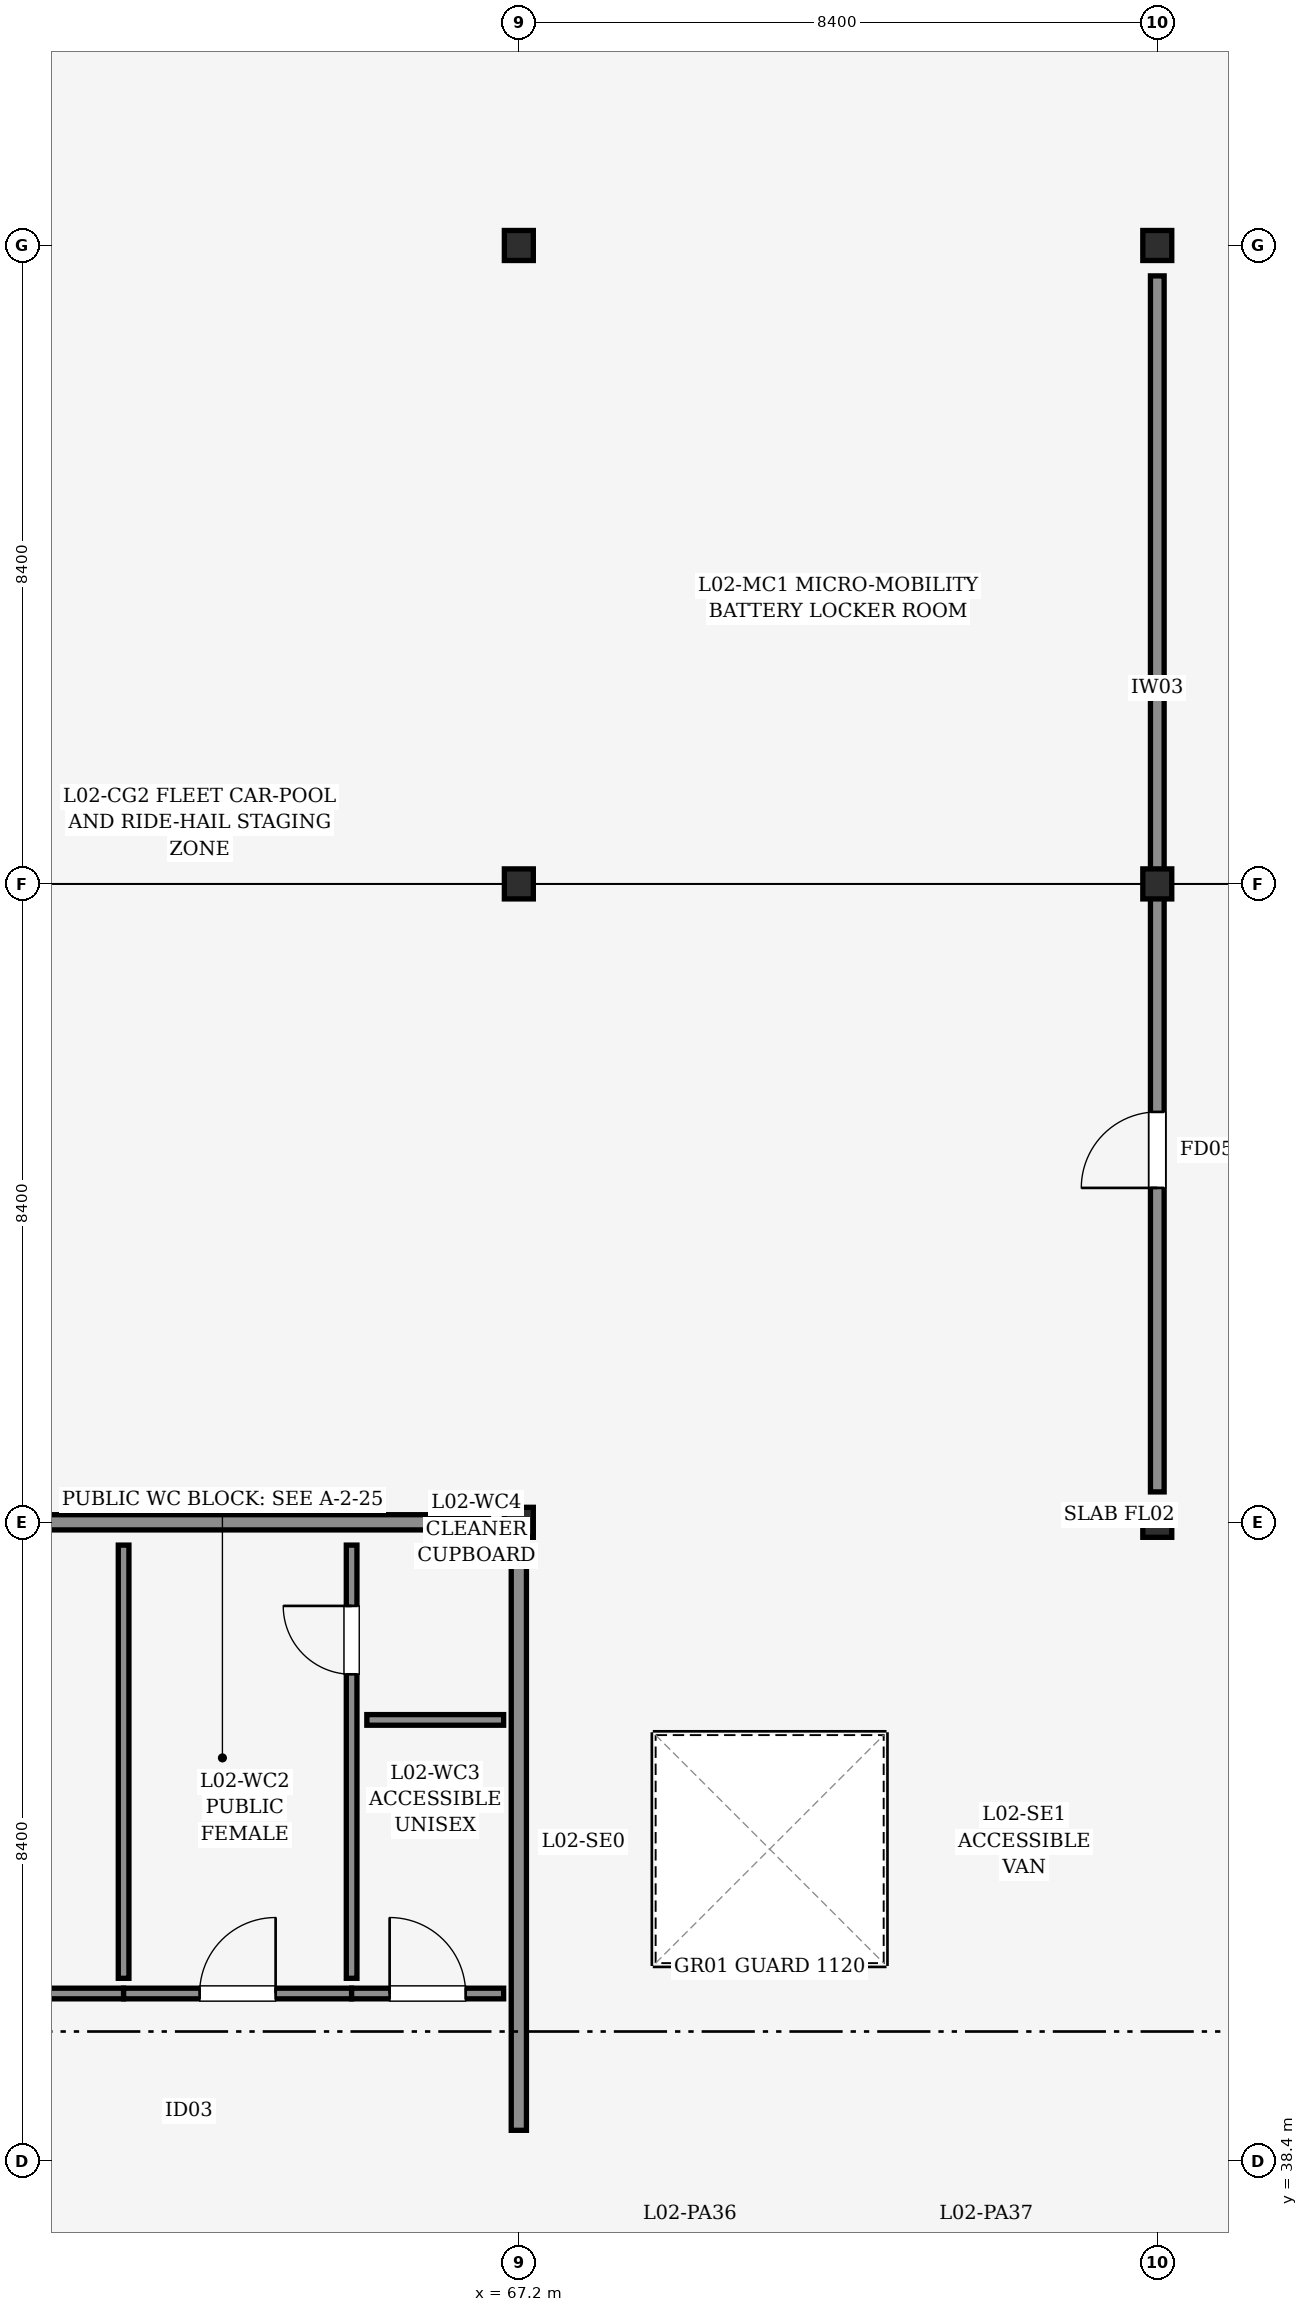
"""IFC4 building model, lengths in metres.
Left out: names, types, materials, properties, quantities, classifications, styles, units other than length and angle.
Written with IfcOpenShell. Run it as: python <this file> out.ifc"""

import sys

from ifc_helpers import new_model, si_unit, direction, frame, frame_2d, origin, origin_2d, place, context, subcontext, project, spatial, rectangle, i_section, extrude, element, fill, save


model = new_model("IFC4")
c1 = context("Model", 3, precision=1e-05, world=origin(), true_north=direction((0.0, 1.0)))
c2 = subcontext(c1, "Body", "Model", "MODEL_VIEW")
j1 = project(units=[si_unit("LENGTHUNIT", "METRE"), si_unit("PLANEANGLEUNIT", "RADIAN")], contexts=[c1])
p1 = place(None, origin())
s1 = spatial("IfcSite", under=j1, at=p1, CompositionType="ELEMENT")
p2 = place(p1, origin())
s2 = spatial("IfcBuilding", under=s1, at=p2, CompositionType="ELEMENT")
p3 = place(p2, frame((0.0, 0.0, 9.0)))
s3 = spatial("IfcBuildingStorey", under=s2, at=p3, CompositionType="ELEMENT", Elevation=9.0)
for number, where, z_axis, x_axis in (
    (1, (67.2, 38.4, 0.0), (0.0, 0.0, 1.0), (1.0, 0.0, 0.0)),
    (2, (67.2, 46.8, 0.0), (0.0, 0.0, 1.0), (1.0, 0.0, 0.0)),
    (3, (67.2, 55.2, 0.0), (0.0, 0.0, 1.0), (1.0, 0.0, 0.0)),
    (4, (67.2, 63.6, 0.0), (0.0, 0.0, 1.0), (1.0, 0.0, 0.0)),
    (5, (75.6, 38.4, 0.0), (0.0, 0.0, 1.0), (1.0, 0.0, 0.0)),
    (6, (75.6, 46.8, 0.0), (0.0, 0.0, 1.0), (1.0, 0.0, 0.0)),
    (7, (75.6, 55.2, 0.0), (0.0, 0.0, 1.0), (1.0, 0.0, 0.0)),
    (8, (75.6, 63.6, 0.0), (0.0, 0.0, 1.0), (1.0, 0.0, 0.0)),
):
    element("IfcColumn", number, at=place(p3, frame(where, z_axis=z_axis, x_axis=x_axis)), inside=s3, PredefinedType="COLUMN", context=c2, shape_type="SweptSolid", body=[
        extrude(i_section(OverallWidth=0.395, OverallDepth=0.381, WebThickness=0.018, FlangeThickness=0.03, FilletRadius=0.015, at=origin_2d()), origin(), (0.0, 0.0, 1.0), 3.6),
    ])
p4 = place(p3, frame((59.2, 38.4, 0.0), z_axis=(0.0, 0.0, 1.0), x_axis=(1.0, 0.0, 0.0)))
e9 = element("IfcWall", 9, at=p4, inside=s3, PredefinedType="PARTITIONING", context=c2, shape_type="SweptSolid", body=[
    extrude(rectangle(XDim=7.6, YDim=0.2, at=frame_2d((3.8, 0.0))), origin(), (0.0, 0.0, 1.0), 2.525),
])
p5 = place(p4, frame((3.2, 0.0, 0.0)))
e10 = element("IfcOpeningElement", 10, at=p5, cuts=e9, PredefinedType="OPENING", context=c2, shape_type="SweptSolid", body=[
    extrude(rectangle(XDim=0.92, YDim=2.1, at=frame_2d((0.46, 1.05))), frame((0.0, 0.11, 0.0), z_axis=(0.0, -1.0, 0.0), x_axis=(1.0, 0.0, 0.0)), (0.0, 0.0, 1.0), 0.22),
])
p6 = place(p3, frame((59.2, 46.8, 0.0), z_axis=(0.0, 0.0, 1.0), x_axis=(1.0, 0.0, 0.0)))
e11 = element("IfcWall", 11, at=p6, inside=s3, PredefinedType="PARTITIONING", context=c2, shape_type="SweptSolid", body=[
    extrude(rectangle(XDim=7.6, YDim=0.2, at=frame_2d((3.8, 0.0))), origin(), (0.0, 0.0, 1.0), 2.525),
])
p7 = place(p3, frame((67.2, 38.8, 0.0), z_axis=(0.0, 0.0, 1.0), x_axis=(0.0, 1.0, 0.0)))
e12 = element("IfcWall", 12, at=p7, inside=s3, PredefinedType="PARTITIONING", context=c2, shape_type="SweptSolid", body=[
    extrude(rectangle(XDim=7.6, YDim=0.2, at=frame_2d((3.8, 0.0))), origin(), (0.0, 0.0, 1.0), 2.525),
])
p8 = place(p3, frame((59.0, 40.6, 0.0), z_axis=(0.0, 0.0, 1.0), x_axis=(1.0, 0.0, 0.0)))
e13 = element("IfcWall", 13, at=p8, inside=s3, PredefinedType="PARTITIONING", context=c2, shape_type="SweptSolid", body=[
    extrude(rectangle(XDim=3.0, YDim=0.14, at=frame_2d((1.5, 0.0))), origin(), (0.0, 0.0, 1.0), 2.525),
])
p9 = place(p8, frame((1.0, 0.0, 0.0)))
e14 = element("IfcOpeningElement", 14, at=p9, cuts=e13, PredefinedType="OPENING", context=c2, shape_type="SweptSolid", body=[
    extrude(rectangle(XDim=1.0, YDim=2.1, at=frame_2d((0.5, 1.05))), frame((0.0, 0.08, 0.0), z_axis=(0.0, -1.0, 0.0), x_axis=(1.0, 0.0, 0.0)), (0.0, 0.0, 1.0), 0.16),
])
p10 = place(p3, frame((62.0, 40.6, 0.0), z_axis=(0.0, 0.0, 1.0), x_axis=(1.0, 0.0, 0.0)))
e15 = element("IfcWall", 15, at=p10, inside=s3, PredefinedType="PARTITIONING", context=c2, shape_type="SweptSolid", body=[
    extrude(rectangle(XDim=3.0, YDim=0.14, at=frame_2d((1.5, 0.0))), origin(), (0.0, 0.0, 1.0), 2.525),
])
p11 = place(p10, frame((1.0, 0.0, 0.0)))
e16 = element("IfcOpeningElement", 16, at=p11, cuts=e15, PredefinedType="OPENING", context=c2, shape_type="SweptSolid", body=[
    extrude(rectangle(XDim=1.0, YDim=2.1, at=frame_2d((0.5, 1.05))), frame((0.0, 0.08, 0.0), z_axis=(0.0, -1.0, 0.0), x_axis=(1.0, 0.0, 0.0)), (0.0, 0.0, 1.0), 0.16),
])
p12 = place(p3, frame((65.0, 40.6, 0.0), z_axis=(0.0, 0.0, 1.0), x_axis=(1.0, 0.0, 0.0)))
e17 = element("IfcWall", 17, at=p12, inside=s3, PredefinedType="PARTITIONING", context=c2, shape_type="SweptSolid", body=[
    extrude(rectangle(XDim=2.0, YDim=0.14, at=frame_2d((1.0, 0.0))), origin(), (0.0, 0.0, 1.0), 2.525),
])
p13 = place(p12, frame((0.5, 0.0, 0.0)))
e18 = element("IfcOpeningElement", 18, at=p13, cuts=e17, PredefinedType="OPENING", context=c2, shape_type="SweptSolid", body=[
    extrude(rectangle(XDim=1.0, YDim=2.1, at=frame_2d((0.5, 1.05))), frame((0.0, 0.08, 0.0), z_axis=(0.0, -1.0, 0.0), x_axis=(1.0, 0.0, 0.0)), (0.0, 0.0, 1.0), 0.16),
])
p14 = place(p3, frame((62.0, 40.8, 0.0), z_axis=(0.0, 0.0, 1.0), x_axis=(0.0, 1.0, 0.0)))
e19 = element("IfcWall", 19, at=p14, inside=s3, PredefinedType="PARTITIONING", context=c2, shape_type="SweptSolid", body=[
    extrude(rectangle(XDim=5.7, YDim=0.14, at=frame_2d((2.85, 0.0))), origin(), (0.0, 0.0, 1.0), 2.525),
])
p15 = place(p3, frame((65.0, 40.8, 0.0), z_axis=(0.0, 0.0, 1.0), x_axis=(0.0, 1.0, 0.0)))
e20 = element("IfcWall", 20, at=p15, inside=s3, PredefinedType="PARTITIONING", context=c2, shape_type="SweptSolid", body=[
    extrude(rectangle(XDim=5.7, YDim=0.14, at=frame_2d((2.85, 0.0))), origin(), (0.0, 0.0, 1.0), 2.525),
])
p16 = place(p15, frame((4.0, 0.0, 0.0)))
e21 = element("IfcOpeningElement", 21, at=p16, cuts=e20, PredefinedType="OPENING", context=c2, shape_type="SweptSolid", body=[
    extrude(rectangle(XDim=0.9, YDim=2.05, at=frame_2d((0.45, 1.025))), frame((0.0, 0.08, 0.0), z_axis=(0.0, -1.0, 0.0), x_axis=(1.0, 0.0, 0.0)), (0.0, 0.0, 1.0), 0.16),
])
p17 = place(p3, frame((65.2, 44.2, 0.0), z_axis=(0.0, 0.0, 1.0), x_axis=(1.0, 0.0, 0.0)))
e22 = element("IfcWall", 22, at=p17, inside=s3, PredefinedType="PARTITIONING", context=c2, shape_type="SweptSolid", body=[
    extrude(rectangle(XDim=1.8, YDim=0.14, at=frame_2d((0.9, 0.0))), origin(), (0.0, 0.0, 1.0), 2.525),
])
p18 = place(p3, frame((75.6, 47.2, 0.0), z_axis=(0.0, 0.0, 1.0), x_axis=(0.0, 1.0, 0.0)))
e23 = element("IfcWall", 23, at=p18, inside=s3, PredefinedType="PARTITIONING", context=c2, shape_type="SweptSolid", body=[
    extrude(rectangle(XDim=16.0, YDim=0.18, at=frame_2d((8.0, 0.0))), origin(), (0.0, 0.0, 1.0), 2.525),
])
p19 = place(p18, frame((4.0, 0.0, 0.0)))
e24 = element("IfcOpeningElement", 24, at=p19, cuts=e23, PredefinedType="OPENING", context=c2, shape_type="SweptSolid", body=[
    extrude(rectangle(XDim=1.0, YDim=2.15, at=frame_2d((0.5, 1.075))), frame((0.0, 0.1, 0.0), z_axis=(0.0, -1.0, 0.0), x_axis=(1.0, 0.0, 0.0)), (0.0, 0.0, 1.0), 0.2),
])
p20 = place(p5, origin())
e25 = element("IfcDoor", 25, at=p20, inside=s3, OperationType="SINGLE_SWING_RIGHT", PredefinedType="DOOR", context=c2, shape_type="SweptSolid", body=[
    extrude(rectangle(XDim=0.92, YDim=2.1, at=frame_2d((0.46, 1.05))), frame((0.0, 0.025, 0.0), z_axis=(0.0, -1.0, 0.0), x_axis=(1.0, 0.0, 0.0)), (0.0, 0.0, 1.0), 0.05),
])
fill(e10, e25)
p21 = place(p11, origin())
e26 = element("IfcDoor", 26, at=p21, inside=s3, OperationType="SINGLE_SWING_RIGHT", PredefinedType="DOOR", context=c2, shape_type="SweptSolid", body=[
    extrude(rectangle(XDim=1.0, YDim=2.1, at=frame_2d((0.5, 1.05))), frame((0.0, 0.025, 0.0), z_axis=(0.0, -1.0, 0.0), x_axis=(1.0, 0.0, 0.0)), (0.0, 0.0, 1.0), 0.05),
])
fill(e16, e26)
p22 = place(p13, origin())
e27 = element("IfcDoor", 27, at=p22, inside=s3, OperationType="SINGLE_SWING_LEFT", PredefinedType="DOOR", context=c2, shape_type="SweptSolid", body=[
    extrude(rectangle(XDim=1.0, YDim=2.1, at=frame_2d((0.5, 1.05))), frame((0.0, 0.025, 0.0), z_axis=(0.0, -1.0, 0.0), x_axis=(1.0, 0.0, 0.0)), (0.0, 0.0, 1.0), 0.05),
])
fill(e18, e27)
p23 = place(p16, origin())
e28 = element("IfcDoor", 28, at=p23, inside=s3, OperationType="SINGLE_SWING_RIGHT", PredefinedType="DOOR", context=c2, shape_type="SweptSolid", body=[
    extrude(rectangle(XDim=0.9, YDim=2.05, at=frame_2d((0.45, 1.025))), frame((0.0, 0.025, 0.0), z_axis=(0.0, -1.0, 0.0), x_axis=(1.0, 0.0, 0.0)), (0.0, 0.0, 1.0), 0.05),
])
fill(e21, e28)
p24 = place(p19, origin())
e29 = element("IfcDoor", 29, at=p24, inside=s3, OperationType="SINGLE_SWING_LEFT", PredefinedType="DOOR", context=c2, shape_type="SweptSolid", body=[
    extrude(rectangle(XDim=1.0, YDim=2.15, at=frame_2d((0.5, 1.075))), frame((0.0, 0.025, 0.0), z_axis=(0.0, -1.0, 0.0), x_axis=(1.0, 0.0, 0.0)), (0.0, 0.0, 1.0), 0.05),
])
fill(e24, e29)
save(model, sys.argv[1])
